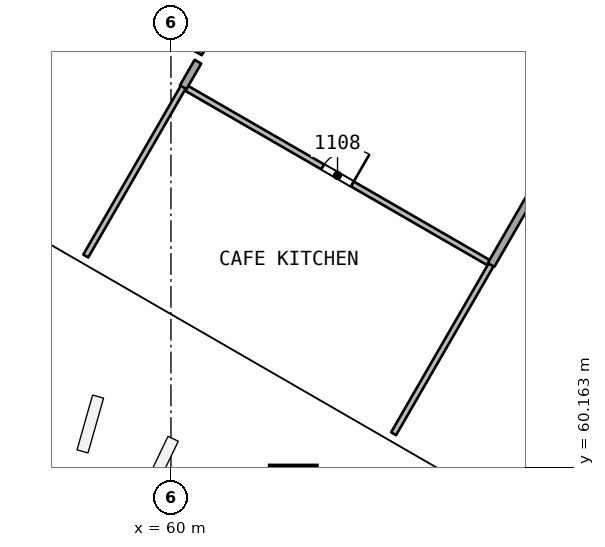
"""IFC4 building model, lengths in metres.
Left out: names, types, materials, properties, quantities, classifications, styles, units other than length and angle.
Written with IfcOpenShell. Run it as: python <this file> out.ifc"""

import sys

from ifc_helpers import new_model, si_unit, direction, frame, frame_2d, origin, origin_2d, place, context, subcontext, project, spatial, rectangle, extrude, element, fill, save


model = new_model("IFC4")
c1 = context("Model", 3, precision=1e-05, world=origin(), true_north=direction((0.0, 1.0)))
c2 = subcontext(c1, "Body", "Model", "MODEL_VIEW")
j1 = project(units=[si_unit("LENGTHUNIT", "METRE"), si_unit("PLANEANGLEUNIT", "RADIAN")], contexts=[c1])
p1 = place(None, origin())
s1 = spatial("IfcSite", under=j1, at=p1, CompositionType="ELEMENT")
p2 = place(p1, origin())
s2 = spatial("IfcBuilding", under=s1, at=p2, CompositionType="ELEMENT")
p3 = place(p2, frame((0.0, 0.0, 52.9)))
s3 = spatial("IfcBuildingStorey", under=s2, at=p3, CompositionType="ELEMENT", Elevation=52.9)
p4 = place(p3, frame((48.797, 78.408, 0.0), z_axis=(0.0, 0.0, 1.0), x_axis=(0.866032504327, -0.499987701298, 0.0)))
e1 = element("IfcWall", 1, at=p4, inside=s3, PredefinedType="SHEAR", context=c2, shape_type="SweptSolid", body=[
    extrude(rectangle(XDim=14.102, YDim=0.8, at=frame_2d((7.051, 0.0))), origin(), (0.0, 0.0, 1.0), 4.4),
])
p5 = place(p3, frame((64.7, 77.748, 0.0), z_axis=(0.0, 0.0, 1.0), x_axis=(0.866026492143, -0.499998114903, 0.0)))
e2 = element("IfcWall", 2, at=p5, inside=s3, PredefinedType="SHEAR", context=c2, shape_type="SweptSolid", body=[
    extrude(rectangle(XDim=15.588, YDim=0.25, at=frame_2d((7.794, 0.0))), origin(), (0.0, 0.0, 1.0), 3.9),
])
p6 = place(p5, frame((4.076, 0.0, 0.0)))
e3 = element("IfcOpeningElement", 3, at=p6, cuts=e2, PredefinedType="OPENING", context=c2, shape_type="SweptSolid", body=[
    extrude(rectangle(XDim=1.2, YDim=2.4, at=frame_2d((0.6, 1.2))), frame((0.0, 0.135, 0.0), z_axis=(0.0, -1.0, 0.0), x_axis=(1.0, 0.0, 0.0)), (0.0, 0.0, 1.0), 0.271),
])
p7 = place(p5, frame((11.871, 0.0, 0.0)))
e4 = element("IfcOpeningElement", 4, at=p7, cuts=e2, PredefinedType="OPENING", context=c2, shape_type="SweptSolid", body=[
    extrude(rectangle(XDim=1.2, YDim=2.4, at=frame_2d((0.6, 1.2))), frame((0.0, 0.135, 0.0), z_axis=(0.0, -1.0, 0.0), x_axis=(1.0, 0.0, 0.0)), (0.0, 0.0, 1.0), 0.271),
])
p8 = place(p3, frame((63.206, 59.573, 0.0), z_axis=(0.010096151254, 0.017474107939, 0.999796340902), x_axis=(-0.865867238205, 0.500273850809, 8.7352e-08)))
e5 = element("IfcColumn", 5, at=p8, inside=s3, PredefinedType="COLUMN", context=c2, shape_type="SweptSolid", body=[
    extrude(rectangle(XDim=1.2, YDim=1.2, at=origin_2d()), origin(), (0.0, 0.0, 1.0), 4.401),
])
p9 = place(p3, frame((60.333, 70.184, 0.0), z_axis=(0.0, 0.0, 1.0), x_axis=(0.866029102363, -0.49999359382, 0.0)))
e6 = element("IfcWall", 6, at=p9, inside=s3, PredefinedType="PARTITIONING", context=c2, shape_type="SweptSolid", body=[
    extrude(rectangle(XDim=9.353, YDim=0.15, at=frame_2d((4.677, 0.0))), origin(), (0.0, 0.0, 1.0), 3.9),
])
p10 = place(p9, frame((4.227, 0.0, 0.0)))
e7 = element("IfcOpeningElement", 7, at=p10, cuts=e6, PredefinedType="OPENING", context=c2, shape_type="SweptSolid", body=[
    extrude(rectangle(XDim=0.9, YDim=2.1, at=frame_2d((0.45, 1.05))), frame((0.0, 0.085, 0.0), z_axis=(0.0, -1.0, 0.0), x_axis=(1.0, 0.0, 0.0)), (0.0, 0.0, 1.0), 0.171),
])
p11 = place(p3, frame((68.423, 65.49, 0.0), z_axis=(0.0, 0.0, 1.0), x_axis=(0.499999262521, 0.866025829568, 0.0)))
e8 = element("IfcWall", 8, at=p11, inside=s3, PredefinedType="PARTITIONING", context=c2, shape_type="SweptSolid", body=[
    extrude(rectangle(XDim=8.754, YDim=0.2, at=frame_2d((4.377, 0.0))), origin(), (0.0, 0.0, 1.0), 3.9),
])
p12 = place(p3, frame((60.323, 70.167, 0.0), z_axis=(0.0, 0.0, 1.0), x_axis=(0.499931386026, 0.866065014457, 0.0)))
e9 = element("IfcWall", 9, at=p12, inside=s3, PredefinedType="PARTITIONING", context=c2, shape_type="SweptSolid", body=[
    extrude(rectangle(XDim=0.775, YDim=0.2, at=frame_2d((0.388, 0.0))), origin(), (0.0, 0.0, 1.0), 3.9),
])
for number, where, z_axis, x_axis in (
    (10, (65.858, 61.048, 0.0), (0.0, 0.0, 1.0), (0.5, 0.866, 0.0)),
    (11, (57.758, 65.725, 0.0), (0.0, 0.0, 1.0), (0.5, 0.866, 0.0)),
):
    element("IfcWall", number, at=place(p3, frame(where, z_axis=z_axis, x_axis=x_axis)), inside=s3, PredefinedType="PARTITIONING", context=c2, shape_type="SweptSolid", body=[
        extrude(rectangle(XDim=5.169, YDim=0.15, at=frame_2d((2.585, 0.0))), origin(), (0.0, 0.0, 1.0), 3.9),
    ])
p13 = place(p10, origin())
e12 = element("IfcDoor", 12, at=p13, inside=s3, OperationType="SINGLE_SWING_RIGHT", PredefinedType="NOTDEFINED", context=c2, shape_type="SweptSolid", body=[
    extrude(rectangle(XDim=0.9, YDim=2.1, at=frame_2d((0.45, 1.05))), frame((0.0, 0.025, 0.0), z_axis=(0.0, -1.0, 0.0), x_axis=(1.0, 0.0, 0.0)), (0.0, 0.0, 1.0), 0.05),
])
fill(e7, e12)
save(model, sys.argv[1])
